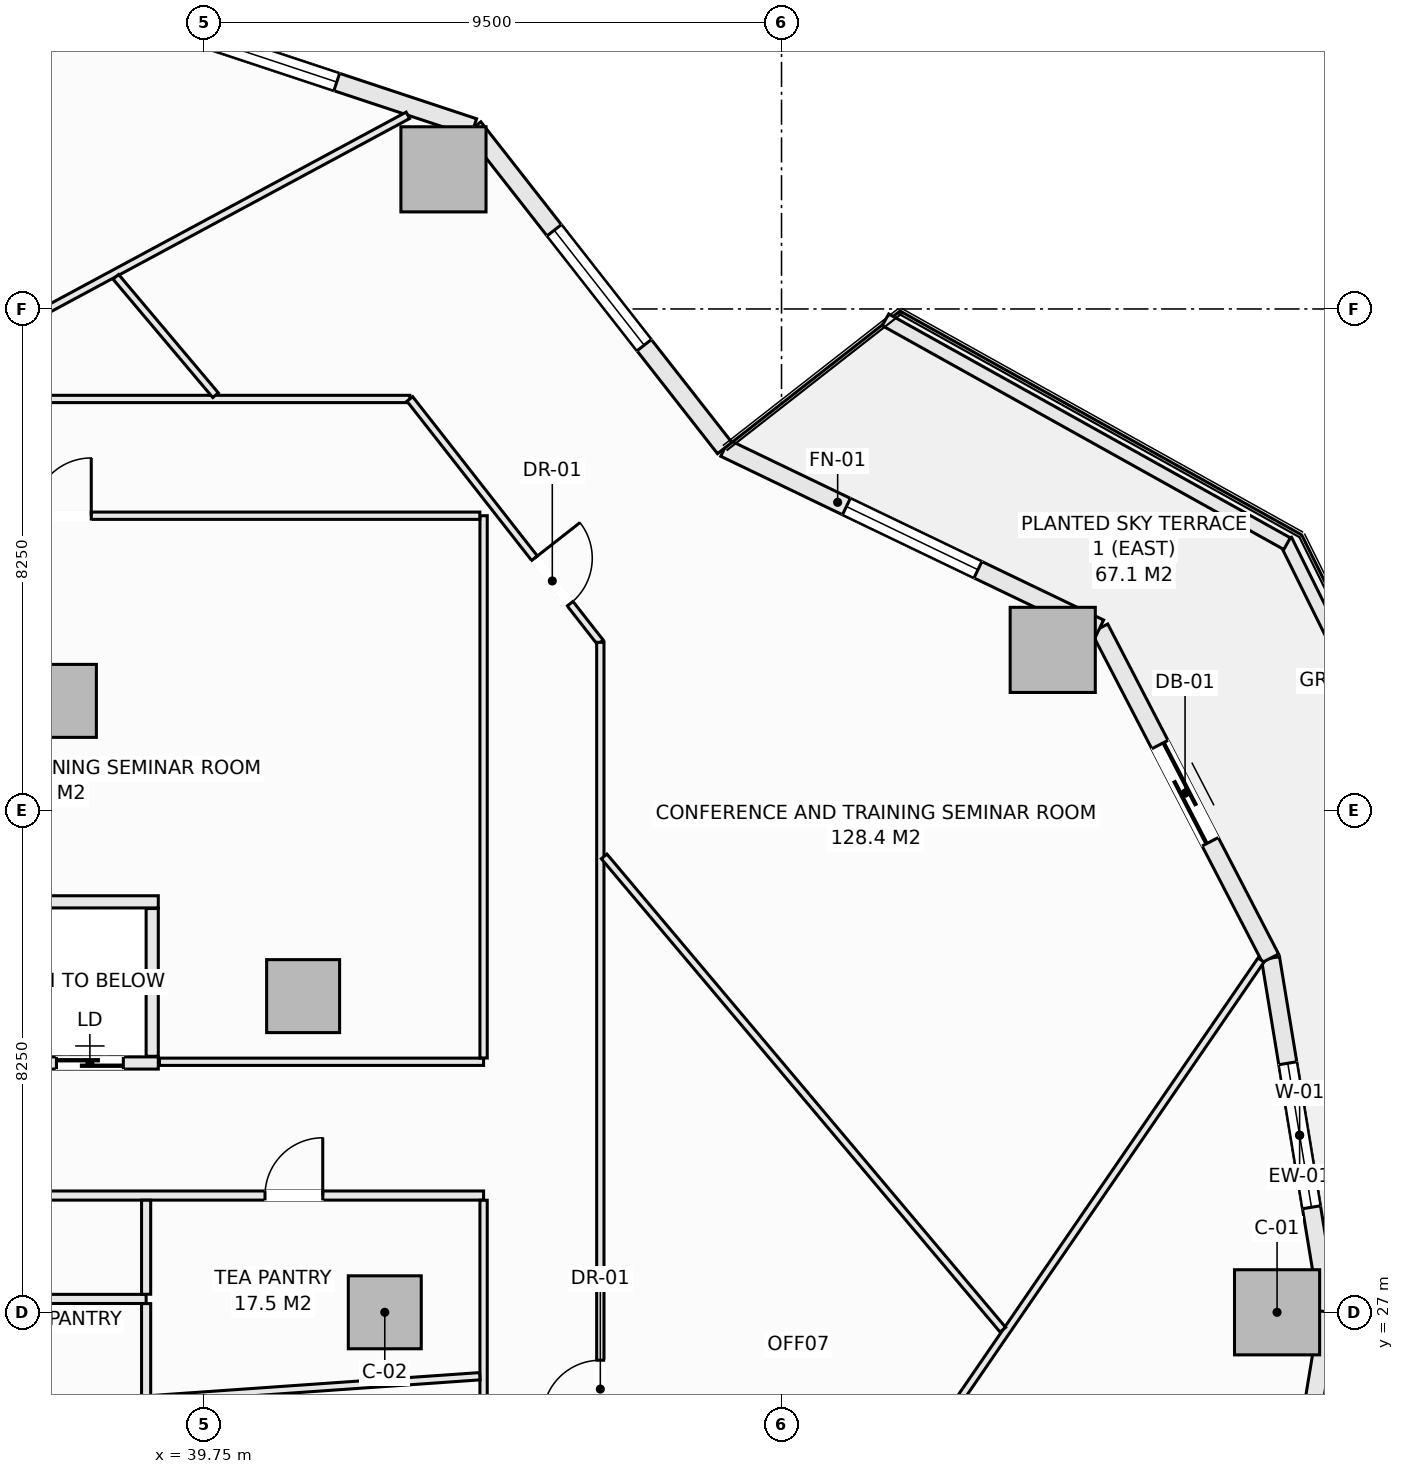
"""IFC4 building model, lengths in metres.
Left out: names, types, materials, properties, quantities, classifications, styles, units other than length and angle.
Written with IfcOpenShell. Run it as: python <this file> out.ifc"""

import sys

from ifc_helpers import new_model, si_unit, direction, frame, frame_2d, origin, origin_2d, place, context, subcontext, project, spatial, rectangle, extrude, element, fill, save


model = new_model("IFC4")
c1 = context("Model", 3, precision=1e-05, world=origin(), true_north=direction((0.0, 1.0)))
c2 = subcontext(c1, "Body", "Model", "MODEL_VIEW")
j1 = project(units=[si_unit("LENGTHUNIT", "METRE"), si_unit("PLANEANGLEUNIT", "RADIAN")], contexts=[c1])
p1 = place(None, origin())
s1 = spatial("IfcSite", under=j1, at=p1, CompositionType="ELEMENT")
p2 = place(p1, origin())
s2 = spatial("IfcBuilding", under=s1, at=p2, CompositionType="ELEMENT")
p3 = place(p2, frame((0.0, 0.0, 34.2)))
s3 = spatial("IfcBuildingStorey", under=s2, at=p3, CompositionType="ELEMENT", Elevation=34.2)
for number, where, z_axis, x_axis in (
    (1, (57.4, 27.0, -0.28), (0.0, 0.0, 1.0), (1.0, 0.0, 0.0)),
    (2, (53.71, 37.894, -0.28), (0.0, 0.0, 1.0), (1.0, 0.0, 0.0)),
    (3, (43.69, 45.796, -0.28), (0.0, 0.0, 1.0), (1.0, 0.0, 0.0)),
):
    element("IfcColumn", number, at=place(p3, frame(where, z_axis=z_axis, x_axis=x_axis)), inside=s3, PredefinedType="COLUMN", context=c2, shape_type="SweptSolid", body=[
        extrude(rectangle(XDim=1.4, YDim=1.4, at=origin_2d()), origin(), (0.0, 0.0, 1.0), 3.85),
    ])
for number, where, z_axis, x_axis in (
    (4, (42.725, 27.0, -0.28), (0.0, 0.0, 1.0), (1.0, 0.0, 0.0)),
    (5, (41.382, 32.199, -0.28), (0.0, 0.0, 1.0), (1.0, 0.0, 0.0)),
    (6, (37.382, 37.055, -0.28), (0.0, 0.0, 1.0), (1.0, 0.0, 0.0)),
):
    element("IfcColumn", number, at=place(p3, frame(where, z_axis=z_axis, x_axis=x_axis)), inside=s3, PredefinedType="COLUMN", context=c2, shape_type="SweptSolid", body=[
        extrude(rectangle(XDim=1.2, YDim=1.2, at=origin_2d()), origin(), (0.0, 0.0, 1.0), 3.85),
    ])
p4 = place(p3, frame((57.292, 32.823, 0.0), z_axis=(0.0, 0.0, 1.0), x_axis=(0.162366057843, -0.98673059305, 0.0)))
e7 = element("IfcWall", 7, at=p4, inside=s3, PredefinedType="SOLIDWALL", context=c2, shape_type="SweptSolid", body=[
    extrude(rectangle(XDim=5.902, YDim=0.3, at=frame_2d((2.951, 0.0))), origin(), (0.0, 0.0, 1.0), 3.093),
])
p5 = place(p4, frame((1.751, 0.0, 0.85)))
e8 = element("IfcOpeningElement", 8, at=p5, cuts=e7, PredefinedType="OPENING", context=c2, shape_type="SweptSolid", body=[
    extrude(rectangle(XDim=2.4, YDim=1.9, at=frame_2d((1.2, 0.95))), frame((0.0, 0.16, 0.0), z_axis=(0.0, -1.0, 0.0), x_axis=(1.0, 0.0, 0.0)), (0.0, 0.0, 1.0), 0.32),
])
p6 = place(p3, frame((54.482, 38.25, 0.0), z_axis=(0.0, 0.0, 1.0), x_axis=(0.459809804413, -0.88801742312, 0.0)))
e9 = element("IfcWall", 9, at=p6, inside=s3, PredefinedType="SOLIDWALL", context=c2, shape_type="SweptSolid", body=[
    extrude(rectangle(XDim=6.111, YDim=0.3, at=frame_2d((3.055, 0.0))), origin(), (0.0, 0.0, 1.0), 3.093),
])
p7 = place(p6, frame((2.155, 0.0, 0.0)))
e10 = element("IfcOpeningElement", 10, at=p7, cuts=e9, PredefinedType="OPENING", context=c2, shape_type="SweptSolid", body=[
    extrude(rectangle(XDim=1.8, YDim=2.25, at=frame_2d((0.9, 1.125))), frame((0.0, 0.16, 0.0), z_axis=(0.0, -1.0, 0.0), x_axis=(1.0, 0.0, 0.0)), (0.0, 0.0, 1.0), 0.32),
])
p8 = place(p3, frame((48.315, 41.213, 0.0), z_axis=(0.0, 0.0, 1.0), x_axis=(0.901360393999, -0.433069786673, 0.0)))
e11 = element("IfcWall", 11, at=p8, inside=s3, PredefinedType="SOLIDWALL", context=c2, shape_type="SweptSolid", body=[
    extrude(rectangle(XDim=6.842, YDim=0.3, at=frame_2d((3.421, 0.0))), origin(), (0.0, 0.0, 1.0), 3.093),
])
p9 = place(p8, frame((2.221, 0.0, 0.85)))
e12 = element("IfcOpeningElement", 12, at=p9, cuts=e11, PredefinedType="OPENING", context=c2, shape_type="SweptSolid", body=[
    extrude(rectangle(XDim=2.4, YDim=1.9, at=frame_2d((1.2, 0.95))), frame((0.0, 0.16, 0.0), z_axis=(0.0, -1.0, 0.0), x_axis=(1.0, 0.0, 0.0)), (0.0, 0.0, 1.0), 0.32),
])
p10 = place(p3, frame((44.188, 46.486, 0.0), z_axis=(0.0, 0.0, 1.0), x_axis=(0.616421309777, -0.787416515482, 0.0)))
e13 = element("IfcWall", 13, at=p10, inside=s3, PredefinedType="SOLIDWALL", context=c2, shape_type="SweptSolid", body=[
    extrude(rectangle(XDim=6.696, YDim=0.3, at=frame_2d((3.348, 0.0))), origin(), (0.0, 0.0, 1.0), 3.093),
])
p11 = place(p10, frame((2.148, 0.0, 0.85)))
e14 = element("IfcOpeningElement", 14, at=p11, cuts=e13, PredefinedType="OPENING", context=c2, shape_type="SweptSolid", body=[
    extrude(rectangle(XDim=2.4, YDim=1.9, at=frame_2d((1.2, 0.95))), frame((0.0, 0.16, 0.0), z_axis=(0.0, -1.0, 0.0), x_axis=(1.0, 0.0, 0.0)), (0.0, 0.0, 1.0), 0.32),
])
p12 = place(p3, frame((37.404, 48.733, 0.0), z_axis=(0.0, 0.0, 1.0), x_axis=(0.949238715533, -0.31455661006, 0.0)))
e15 = element("IfcWall", 15, at=p12, inside=s3, PredefinedType="SOLIDWALL", context=c2, shape_type="SweptSolid", body=[
    extrude(rectangle(XDim=7.146, YDim=0.3, at=frame_2d((3.573, 0.0))), origin(), (0.0, 0.0, 1.0), 3.093),
])
p13 = place(p12, frame((2.373, 0.0, 0.85)))
e16 = element("IfcOpeningElement", 16, at=p13, cuts=e15, PredefinedType="OPENING", context=c2, shape_type="SweptSolid", body=[
    extrude(rectangle(XDim=2.4, YDim=1.9, at=frame_2d((1.2, 0.95))), frame((0.0, 0.16, 0.0), z_axis=(0.0, -1.0, 0.0), x_axis=(1.0, 0.0, 0.0)), (0.0, 0.0, 1.0), 0.32),
])
p14 = place(p3, frame((57.292, 21.177, 0.0), z_axis=(0.0, 0.0, 1.0), x_axis=(0.162366057843, 0.98673059305, 0.0)))
e17 = element("IfcWall", 17, at=p14, inside=s3, PredefinedType="SOLIDWALL", context=c2, shape_type="SweptSolid", body=[
    extrude(rectangle(XDim=5.902, YDim=0.3, at=frame_2d((2.951, 0.0))), origin(), (0.0, 0.0, 1.0), 3.093),
])
p15 = place(p14, frame((1.751, 0.0, 0.85)))
e18 = element("IfcOpeningElement", 18, at=p15, cuts=e17, PredefinedType="OPENING", context=c2, shape_type="SweptSolid", body=[
    extrude(rectangle(XDim=2.4, YDim=1.9, at=frame_2d((1.2, 0.95))), frame((0.0, 0.16, 0.0), z_axis=(0.0, -1.0, 0.0), x_axis=(1.0, 0.0, 0.0)), (0.0, 0.0, 1.0), 0.32),
])
p16 = place(p3, frame((57.539, 39.697, 0.0), z_axis=(0.0, 0.0, 1.0), x_axis=(0.443578479433, -0.8962355341, 0.0)))
e19 = element("IfcWall", 19, at=p16, inside=s3, PredefinedType="PARAPET", context=c2, shape_type="SweptSolid", body=[
    extrude(rectangle(XDim=6.911, YDim=0.22, at=frame_2d((3.456, 0.0))), origin(), (0.0, 0.0, 1.0), 0.52),
])
p17 = place(p3, frame((50.959, 43.322, 0.0), z_axis=(0.0, 0.0, 1.0), x_axis=(0.873500119739, -0.48682393205, 0.0)))
e20 = element("IfcWall", 20, at=p17, inside=s3, PredefinedType="PARAPET", context=c2, shape_type="SweptSolid", body=[
    extrude(rectangle(XDim=7.562, YDim=0.22, at=frame_2d((3.781, 0.0))), origin(), (0.0, 0.0, 1.0), 0.52),
])
p18 = place(p3, frame((36.75, 33.75, 0.0), z_axis=(0.0, 0.0, 1.0), x_axis=(1.0, 0.0, 0.0)))
e21 = element("IfcWall", 21, at=p18, inside=s3, PredefinedType="SOLIDWALL", context=c2, shape_type="SweptSolid", body=[
    extrude(rectangle(XDim=2.25, YDim=0.2, at=frame_2d((1.125, 0.0))), origin(), (0.0, 0.0, 1.0), 3.57),
])
p19 = place(p3, frame((36.75, 31.1, 0.0), z_axis=(0.0, 0.0, 1.0), x_axis=(1.0, 0.0, 0.0)))
e22 = element("IfcWall", 22, at=p19, inside=s3, PredefinedType="SOLIDWALL", context=c2, shape_type="SweptSolid", body=[
    extrude(rectangle(XDim=2.25, YDim=0.2, at=frame_2d((1.125, 0.0))), origin(), (0.0, 0.0, 1.0), 3.57),
])
p20 = place(p19, frame((0.575, 0.0, 0.0)))
e23 = element("IfcOpeningElement", 23, at=p20, cuts=e22, PredefinedType="OPENING", context=c2, shape_type="SweptSolid", body=[
    extrude(rectangle(XDim=1.1, YDim=2.2, at=frame_2d((0.55, 1.1))), frame((0.0, 0.11, 0.0), z_axis=(0.0, -1.0, 0.0), x_axis=(1.0, 0.0, 0.0)), (0.0, 0.0, 1.0), 0.22),
])
p21 = place(p3, frame((38.9, 31.21, 0.0), z_axis=(0.0, 0.0, 1.0), x_axis=(0.0, 1.0, 0.0)))
e24 = element("IfcWall", 24, at=p21, inside=s3, PredefinedType="SOLIDWALL", context=c2, shape_type="SweptSolid", body=[
    extrude(rectangle(XDim=2.43, YDim=0.2, at=frame_2d((1.215, 0.0))), origin(), (0.0, 0.0, 1.0), 3.57),
])
p22 = place(p3, frame((30.077, 28.92, 0.0), z_axis=(0.0, 0.0, 1.0), x_axis=(1.0, 0.0, 0.0)))
e25 = element("IfcWall", 25, at=p22, inside=s3, PredefinedType="PARTITIONING", context=c2, shape_type="SweptSolid", body=[
    extrude(rectangle(XDim=14.273, YDim=0.15, at=frame_2d((7.137, 0.0))), origin(), (0.0, 0.0, 1.0), 3.57),
])
p23 = place(p22, frame((1.342, 0.0, 0.0)))
e26 = element("IfcOpeningElement", 26, at=p23, cuts=e25, PredefinedType="OPENING", context=c2, shape_type="SweptSolid", body=[
    extrude(rectangle(XDim=0.95, YDim=2.1, at=frame_2d((0.475, 1.05))), frame((0.0, 0.085, 0.0), z_axis=(0.0, -1.0, 0.0), x_axis=(1.0, 0.0, 0.0)), (0.0, 0.0, 1.0), 0.17),
])
p24 = place(p22, frame((5.498, 0.0, 0.0)))
e27 = element("IfcOpeningElement", 27, at=p24, cuts=e25, PredefinedType="OPENING", context=c2, shape_type="SweptSolid", body=[
    extrude(rectangle(XDim=0.95, YDim=2.1, at=frame_2d((0.475, 1.05))), frame((0.0, 0.085, 0.0), z_axis=(0.0, -1.0, 0.0), x_axis=(1.0, 0.0, 0.0)), (0.0, 0.0, 1.0), 0.17),
])
p25 = place(p22, frame((10.678, 0.0, 0.0)))
e28 = element("IfcOpeningElement", 28, at=p25, cuts=e25, PredefinedType="OPENING", context=c2, shape_type="SweptSolid", body=[
    extrude(rectangle(XDim=0.95, YDim=2.1, at=frame_2d((0.475, 1.05))), frame((0.0, 0.085, 0.0), z_axis=(0.0, -1.0, 0.0), x_axis=(1.0, 0.0, 0.0)), (0.0, 0.0, 1.0), 0.17),
])
p26 = place(p3, frame((33.377, 27.22, 0.0), z_axis=(0.0, 0.0, 1.0), x_axis=(1.0, 0.0, 0.0)))
e29 = element("IfcWall", 29, at=p26, inside=s3, PredefinedType="PARTITIONING", context=c2, shape_type="SweptSolid", body=[
    extrude(rectangle(XDim=5.423, YDim=0.15, at=frame_2d((2.711, 0.0))), origin(), (0.0, 0.0, 1.0), 3.57),
])
p27 = place(p3, frame((38.8, 25.197, 0.0), z_axis=(0.0, 0.0, 1.0), x_axis=(0.0, 1.0, 0.0)))
e30 = element("IfcWall", 30, at=p27, inside=s3, PredefinedType="PARTITIONING", context=c2, shape_type="SweptSolid", body=[
    extrude(rectangle(XDim=1.946, YDim=0.15, at=frame_2d((0.973, 0.0))), origin(), (0.0, 0.0, 1.0), 3.57),
])
p28 = place(p3, frame((38.8, 27.297, 0.0), z_axis=(0.0, 0.0, 1.0), x_axis=(0.0, 1.0, 0.0)))
e31 = element("IfcWall", 31, at=p28, inside=s3, PredefinedType="PARTITIONING", context=c2, shape_type="SweptSolid", body=[
    extrude(rectangle(XDim=1.546, YDim=0.15, at=frame_2d((0.773, 0.0))), origin(), (0.0, 0.0, 1.0), 3.57),
])
p29 = place(p3, frame((39.02, 31.12, 0.0), z_axis=(0.0, 0.0, 1.0), x_axis=(1.0, 0.0, 0.0)))
e32 = element("IfcWall", 32, at=p29, inside=s3, PredefinedType="PARTITIONING", context=c2, shape_type="SweptSolid", body=[
    extrude(rectangle(XDim=5.33, YDim=0.12, at=frame_2d((2.665, 0.0))), origin(), (0.0, 0.0, 1.0), 3.57),
])
p30 = place(p3, frame((44.35, 25.197, 0.0), z_axis=(0.0, 0.0, 1.0), x_axis=(0.0, 1.0, 0.0)))
e33 = element("IfcWall", 33, at=p30, inside=s3, PredefinedType="PARTITIONING", context=c2, shape_type="SweptSolid", body=[
    extrude(rectangle(XDim=3.646, YDim=0.12, at=frame_2d((1.823, 0.0))), origin(), (0.0, 0.0, 1.0), 3.57),
])
p31 = place(p3, frame((44.35, 31.182, 0.0), z_axis=(0.0, 0.0, 1.0), x_axis=(0.0, 1.0, 0.0)))
e34 = element("IfcWall", 34, at=p31, inside=s3, PredefinedType="PARTITIONING", context=c2, shape_type="SweptSolid", body=[
    extrude(rectangle(XDim=8.918, YDim=0.12, at=frame_2d((4.459, 0.0))), origin(), (0.0, 0.0, 1.0), 3.57),
])
p32 = place(p3, frame((30.557, 40.1, 0.0), z_axis=(0.0, 0.0, 1.0), x_axis=(1.0, 0.0, 0.0)))
e35 = element("IfcWall", 35, at=p32, inside=s3, PredefinedType="PARTITIONING", context=c2, shape_type="SweptSolid", body=[
    extrude(rectangle(XDim=13.731, YDim=0.12, at=frame_2d((6.866, 0.0))), origin(), (0.0, 0.0, 1.0), 3.57),
])
p33 = place(p32, frame((6.39, 0.0, 0.0)))
e36 = element("IfcOpeningElement", 36, at=p33, cuts=e35, PredefinedType="OPENING", context=c2, shape_type="SweptSolid", body=[
    extrude(rectangle(XDim=0.95, YDim=2.1, at=frame_2d((0.475, 1.05))), frame((0.0, 0.07, 0.0), z_axis=(0.0, -1.0, 0.0), x_axis=(1.0, 0.0, 0.0)), (0.0, 0.0, 1.0), 0.14),
])
p34 = place(p3, frame((23.462, 42.02, 0.0), z_axis=(0.0, 0.0, 1.0), x_axis=(1.0, 0.0, 0.0)))
e37 = element("IfcWall", 37, at=p34, inside=s3, PredefinedType="PARTITIONING", context=c2, shape_type="SweptSolid", body=[
    extrude(rectangle(XDim=19.675, YDim=0.12, at=frame_2d((9.837, 0.0))), origin(), (0.0, 0.0, 1.0), 3.57),
])
p35 = place(p34, frame((7.877, 0.0, 0.0)))
e38 = element("IfcOpeningElement", 38, at=p35, cuts=e37, PredefinedType="OPENING", context=c2, shape_type="SweptSolid", body=[
    extrude(rectangle(XDim=0.95, YDim=2.1, at=frame_2d((0.475, 1.05))), frame((0.0, 0.07, 0.0), z_axis=(0.0, -1.0, 0.0), x_axis=(1.0, 0.0, 0.0)), (0.0, 0.0, 1.0), 0.14),
])
p36 = place(p34, frame((2.511, 0.0, 0.0)))
e39 = element("IfcOpeningElement", 39, at=p36, cuts=e37, PredefinedType="OPENING", context=c2, shape_type="SweptSolid", body=[
    extrude(rectangle(XDim=0.95, YDim=2.1, at=frame_2d((0.475, 1.05))), frame((0.0, 0.07, 0.0), z_axis=(0.0, -1.0, 0.0), x_axis=(1.0, 0.0, 0.0)), (0.0, 0.0, 1.0), 0.14),
])
p37 = place(p3, frame((43.137, 42.02, 0.0), z_axis=(0.0, 0.0, 1.0), x_axis=(0.616441660183, -0.787400583941, 0.0)))
e40 = element("IfcWall", 40, at=p37, inside=s3, PredefinedType="PARTITIONING", context=c2, shape_type="SweptSolid", body=[
    extrude(rectangle(XDim=5.083, YDim=0.12, at=frame_2d((2.541, 0.0))), origin(), (0.0, 0.0, 1.0), 3.57),
])
p38 = place(p37, frame((3.326, 0.0, 0.0)))
e41 = element("IfcOpeningElement", 41, at=p38, cuts=e40, PredefinedType="OPENING", context=c2, shape_type="SweptSolid", body=[
    extrude(rectangle(XDim=0.95, YDim=2.1, at=frame_2d((0.475, 1.05))), frame((0.0, 0.07, 0.0), z_axis=(0.0, -1.0, 0.0), x_axis=(1.0, 0.0, 0.0)), (0.0, 0.0, 1.0), 0.14),
])
p39 = place(p3, frame((46.27, 15.982, 0.0), z_axis=(0.0, 0.0, 1.0), x_axis=(0.0, 1.0, 0.0)))
e42 = element("IfcWall", 42, at=p39, inside=s3, PredefinedType="PARTITIONING", context=c2, shape_type="SweptSolid", body=[
    extrude(rectangle(XDim=22.036, YDim=0.12, at=frame_2d((11.018, 0.0))), origin(), (0.0, 0.0, 1.0), 3.57),
])
p40 = place(p39, frame((9.28, 0.0, 0.0)))
e43 = element("IfcOpeningElement", 43, at=p40, cuts=e42, PredefinedType="OPENING", context=c2, shape_type="SweptSolid", body=[
    extrude(rectangle(XDim=0.95, YDim=2.1, at=frame_2d((0.475, 1.05))), frame((0.0, 0.07, 0.0), z_axis=(0.0, -1.0, 0.0), x_axis=(1.0, 0.0, 0.0)), (0.0, 0.0, 1.0), 0.14),
])
p41 = place(p3, frame((34.557, 42.082, 0.0), z_axis=(0.0, 0.0, 1.0), x_axis=(0.880504205361, 0.474038336362, 0.0)))
e44 = element("IfcWall", 44, at=p41, inside=s3, PredefinedType="PARTITIONING", context=c2, shape_type="SweptSolid", body=[
    extrude(rectangle(XDim=9.708, YDim=0.12, at=frame_2d((4.854, 0.0))), origin(), (0.0, 0.0, 1.0), 3.57),
])
p42 = place(p3, frame((46.332, 17.045, 0.0), z_axis=(0.0, 0.0, 1.0), x_axis=(0.565716902062, 0.824599531119, 0.0)))
e45 = element("IfcWall", 45, at=p42, inside=s3, PredefinedType="PARTITIONING", context=c2, shape_type="SweptSolid", body=[
    extrude(rectangle(XDim=19.098, YDim=0.12, at=frame_2d((9.549, 0.0))), origin(), (0.0, 0.0, 1.0), 3.57),
])
p43 = place(p3, frame((38.302, 44.028, 0.0), z_axis=(0.0, 0.0, 1.0), x_axis=(0.644336623354, -0.764741992965, 0.0)))
e46 = element("IfcWall", 46, at=p43, inside=s3, PredefinedType="PARTITIONING", context=c2, shape_type="SweptSolid", body=[
    extrude(rectangle(XDim=2.545, YDim=0.12, at=frame_2d((1.272, 0.0))), origin(), (0.0, 0.0, 1.0), 3.57),
])
p44 = place(p3, frame((46.332, 34.497, 0.0), z_axis=(0.0, 0.0, 1.0), x_axis=(0.644329997074, -0.764747575917, 0.0)))
e47 = element("IfcWall", 47, at=p44, inside=s3, PredefinedType="PARTITIONING", context=c2, shape_type="SweptSolid", body=[
    extrude(rectangle(XDim=10.178, YDim=0.12, at=frame_2d((5.089, 0.0))), origin(), (0.0, 0.0, 1.0), 3.57),
])
p45 = place(p3, frame((38.877, 25.57, 0.0), z_axis=(0.0, 0.0, 1.0), x_axis=(0.997563605061, 0.069762840094, 0.0)))
e48 = element("IfcWall", 48, at=p45, inside=s3, PredefinedType="PARTITIONING", context=c2, shape_type="SweptSolid", body=[
    extrude(rectangle(XDim=5.424, YDim=0.12, at=frame_2d((2.712, 0.0))), origin(), (0.0, 0.0, 1.0), 3.57),
])
p46 = place(p5, origin())
e49 = element("IfcWindow", 49, at=p46, inside=s3, PartitioningType="SINGLE_PANEL", PredefinedType="WINDOW", context=c2, shape_type="SweptSolid", body=[
    extrude(rectangle(XDim=2.4, YDim=1.9, at=frame_2d((1.2, 0.95))), frame((0.0, 0.03, 0.0), z_axis=(0.0, -1.0, 0.0), x_axis=(1.0, 0.0, 0.0)), (0.0, 0.0, 1.0), 0.06),
])
fill(e8, e49)
p47 = place(p7, origin())
e50 = element("IfcDoor", 50, at=p47, inside=s3, OperationType="SLIDING_TO_LEFT", PredefinedType="DOOR", context=c2, shape_type="SweptSolid", body=[
    extrude(rectangle(XDim=1.8, YDim=2.25, at=frame_2d((0.9, 1.125))), frame((0.0, 0.025, 0.0), z_axis=(0.0, -1.0, 0.0), x_axis=(1.0, 0.0, 0.0)), (0.0, 0.0, 1.0), 0.05),
])
fill(e10, e50)
p48 = place(p9, origin())
e51 = element("IfcWindow", 51, at=p48, inside=s3, PartitioningType="SINGLE_PANEL", PredefinedType="WINDOW", context=c2, shape_type="SweptSolid", body=[
    extrude(rectangle(XDim=2.4, YDim=1.9, at=frame_2d((1.2, 0.95))), frame((0.0, 0.03, 0.0), z_axis=(0.0, -1.0, 0.0), x_axis=(1.0, 0.0, 0.0)), (0.0, 0.0, 1.0), 0.06),
])
fill(e12, e51)
p49 = place(p11, origin())
e52 = element("IfcWindow", 52, at=p49, inside=s3, PartitioningType="SINGLE_PANEL", PredefinedType="WINDOW", context=c2, shape_type="SweptSolid", body=[
    extrude(rectangle(XDim=2.4, YDim=1.9, at=frame_2d((1.2, 0.95))), frame((0.0, 0.03, 0.0), z_axis=(0.0, -1.0, 0.0), x_axis=(1.0, 0.0, 0.0)), (0.0, 0.0, 1.0), 0.06),
])
fill(e14, e52)
p50 = place(p13, origin())
e53 = element("IfcWindow", 53, at=p50, inside=s3, PartitioningType="SINGLE_PANEL", PredefinedType="WINDOW", context=c2, shape_type="SweptSolid", body=[
    extrude(rectangle(XDim=2.4, YDim=1.9, at=frame_2d((1.2, 0.95))), frame((0.0, 0.03, 0.0), z_axis=(0.0, -1.0, 0.0), x_axis=(1.0, 0.0, 0.0)), (0.0, 0.0, 1.0), 0.06),
])
fill(e16, e53)
p51 = place(p20, origin())
e54 = element("IfcDoor", 54, at=p51, inside=s3, OperationType="SLIDING_TO_LEFT", PredefinedType="DOOR", context=c2, shape_type="SweptSolid", body=[
    extrude(rectangle(XDim=1.1, YDim=2.2, at=frame_2d((0.55, 1.1))), frame((0.0, 0.025, 0.0), z_axis=(0.0, -1.0, 0.0), x_axis=(1.0, 0.0, 0.0)), (0.0, 0.0, 1.0), 0.05),
])
fill(e23, e54)
p52 = place(p40, origin())
e55 = element("IfcDoor", 55, at=p52, inside=s3, OperationType="SINGLE_SWING_LEFT", PredefinedType="DOOR", context=c2, shape_type="SweptSolid", body=[
    extrude(rectangle(XDim=0.95, YDim=2.1, at=frame_2d((0.475, 1.05))), frame((0.0, 0.025, 0.0), z_axis=(0.0, -1.0, 0.0), x_axis=(1.0, 0.0, 0.0)), (0.0, 0.0, 1.0), 0.05),
])
fill(e43, e55)
p53 = place(p25, origin())
e56 = element("IfcDoor", 56, at=p53, inside=s3, OperationType="SINGLE_SWING_RIGHT", PredefinedType="DOOR", context=c2, shape_type="SweptSolid", body=[
    extrude(rectangle(XDim=0.95, YDim=2.1, at=frame_2d((0.475, 1.05))), frame((0.0, 0.025, 0.0), z_axis=(0.0, -1.0, 0.0), x_axis=(1.0, 0.0, 0.0)), (0.0, 0.0, 1.0), 0.05),
])
fill(e28, e56)
p54 = place(p38, origin())
e57 = element("IfcDoor", 57, at=p54, inside=s3, OperationType="SINGLE_SWING_LEFT", PredefinedType="DOOR", context=c2, shape_type="SweptSolid", body=[
    extrude(rectangle(XDim=0.95, YDim=2.1, at=frame_2d((0.475, 1.05))), frame((0.0, 0.025, 0.0), z_axis=(0.0, -1.0, 0.0), x_axis=(1.0, 0.0, 0.0)), (0.0, 0.0, 1.0), 0.05),
])
fill(e41, e57)
p55 = place(p33, origin())
e58 = element("IfcDoor", 58, at=p55, inside=s3, OperationType="SINGLE_SWING_RIGHT", PredefinedType="DOOR", context=c2, shape_type="SweptSolid", body=[
    extrude(rectangle(XDim=0.95, YDim=2.1, at=frame_2d((0.475, 1.05))), frame((0.0, 0.025, 0.0), z_axis=(0.0, -1.0, 0.0), x_axis=(1.0, 0.0, 0.0)), (0.0, 0.0, 1.0), 0.05),
])
fill(e36, e58)
save(model, sys.argv[1])
